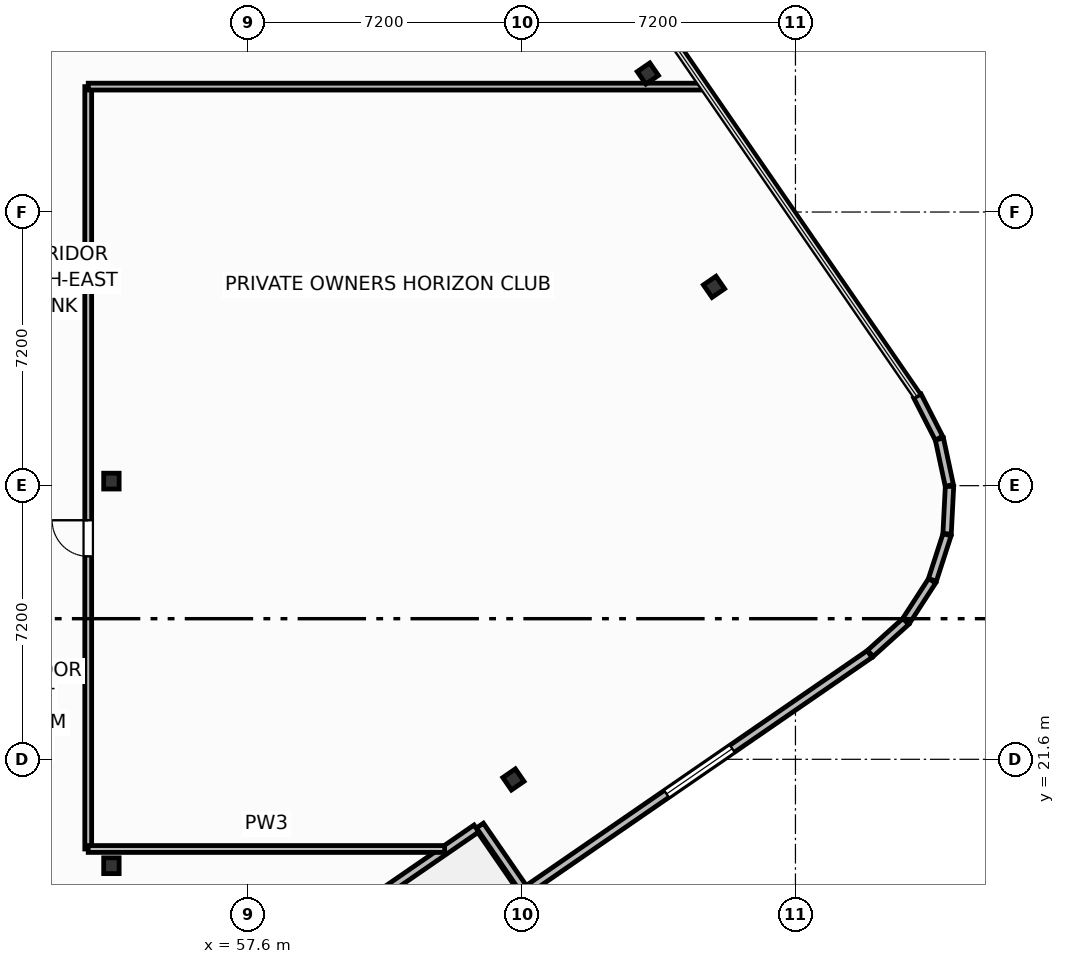
"""IFC4 building model, lengths in metres.
Left out: names, types, materials, properties, quantities, classifications, styles, units other than length and angle.
Written with IfcOpenShell. Run it as: python <this file> out.ifc"""

import sys

from ifc_helpers import new_model, si_unit, direction, frame, frame_2d, origin, origin_2d, place, context, subcontext, project, spatial, rectangle, i_section, extrude, element, fill, save


model = new_model("IFC4")
c1 = context("Model", 3, precision=1e-05, world=origin(), true_north=direction((0.0, 1.0)))
c2 = subcontext(c1, "Body", "Model", "MODEL_VIEW")
j1 = project(units=[si_unit("LENGTHUNIT", "METRE"), si_unit("PLANEANGLEUNIT", "RADIAN")], contexts=[c1])
p1 = place(None, origin())
s1 = spatial("IfcSite", under=j1, at=p1, CompositionType="ELEMENT")
p2 = place(p1, origin())
s2 = spatial("IfcBuilding", under=s1, at=p2, CompositionType="ELEMENT")
p3 = place(p2, frame((0.0, 0.0, 280.4)))
s3 = spatial("IfcBuildingStorey", under=s2, at=p3, CompositionType="ELEMENT", Elevation=280.4)
for number, where, z_axis, x_axis in (
    (1, (54.0, 18.8, 0.0), (0.0, 0.0, 1.0), (1.0, 0.0, 0.0)),
    (2, (54.0, 28.92, 0.0), (0.0, 0.0, 1.0), (1.0, 0.0, 0.0)),
):
    element("IfcColumn", number, at=place(p3, frame(where, z_axis=z_axis, x_axis=x_axis)), inside=s3, PredefinedType="COLUMN", context=c2, shape_type="SweptSolid", body=[
        extrude(i_section(OverallWidth=0.406, OverallDepth=0.416, WebThickness=0.03, FlangeThickness=0.048, FilletRadius=0.025, at=origin_2d()), origin(), (0.0, 0.0, 1.0), 3.7),
    ])
for number, where, z_axis, x_axis in (
    (3, (64.578, 21.07, 0.0), (0.0, 0.0, 1.0), (0.824, 0.567, 0.0)),
    (4, (69.857, 34.031, 0.0), (0.0, 0.0, 1.0), (0.824, 0.567, 0.0)),
    (5, (68.115, 39.644, 0.0), (0.0, 0.0, 1.0), (0.824, 0.567, 0.0)),
):
    element("IfcColumn", number, at=place(p3, frame(where, z_axis=z_axis, x_axis=x_axis)), inside=s3, PredefinedType="COLUMN", context=c2, shape_type="SweptSolid", body=[
        extrude(i_section(OverallWidth=0.401, OverallDepth=0.399, WebThickness=0.025, FlangeThickness=0.04, FilletRadius=0.022, at=origin_2d()), origin(), (0.0, 0.0, 1.0), 3.7),
    ])
p4 = place(p3, frame((63.605, 19.78, 0.0), z_axis=(0.0, 0.0, 1.0), x_axis=(-0.823541290762, -0.567256328665, 0.0)))
e6 = element("IfcWall", 6, at=p4, inside=s3, PredefinedType="SOLIDWALL", context=c2, shape_type="SweptSolid", body=[
    extrude(rectangle(XDim=5.567, YDim=0.22, at=frame_2d((2.784, 0.0))), origin(), (0.0, 0.0, 1.0), 2.73),
])
p5 = place(p4, frame((3.067, 0.0, 0.0)))
e7 = element("IfcOpeningElement", 7, at=p5, cuts=e6, PredefinedType="OPENING", context=c2, shape_type="SweptSolid", body=[
    extrude(rectangle(XDim=2.1, YDim=2.3, at=frame_2d((1.05, 1.15))), frame((0.0, 0.12, 0.0), z_axis=(0.0, -1.0, 0.0), x_axis=(1.0, 0.0, 0.0)), (0.0, 0.0, 1.0), 0.24),
])
p6 = place(p3, frame((63.698, 19.856, 0.0), z_axis=(0.0, 0.0, 1.0), x_axis=(0.567219383419, -0.823566737474, 0.0)))
e8 = element("IfcWall", 8, at=p6, inside=s3, PredefinedType="SOLIDWALL", context=c2, shape_type="SweptSolid", body=[
    extrude(rectangle(XDim=2.1, YDim=0.22, at=frame_2d((1.05, 0.0))), origin(), (0.0, 0.0, 1.0), 2.73),
])
p7 = place(p3, frame((64.992, 18.198, 0.0), z_axis=(0.0, 0.0, 1.0), x_axis=(0.823538117322, 0.56726093583, 0.0)))
e9 = element("IfcWall", 9, at=p7, inside=s3, PredefinedType="SOLIDWALL", context=c2, shape_type="SweptSolid", body=[
    extrude(rectangle(XDim=10.88, YDim=0.22, at=frame_2d((5.44, 0.0))), origin(), (0.0, 0.0, 1.0), 2.73),
])
p8 = place(p7, frame((4.39, 0.0, 0.8)))
e10 = element("IfcOpeningElement", 10, at=p8, cuts=e9, PredefinedType="OPENING", context=c2, shape_type="SweptSolid", body=[
    extrude(rectangle(XDim=2.1, YDim=1.75, at=frame_2d((1.05, 0.875))), frame((0.0, 0.12, 0.0), z_axis=(0.0, -1.0, 0.0), x_axis=(1.0, 0.0, 0.0)), (0.0, 0.0, 1.0), 0.24),
])
p9 = place(p3, frame((73.971, 24.387, 0.0), z_axis=(0.0, 0.0, 1.0), x_axis=(0.742501517089, 0.669844382764, 0.0)))
e11 = element("IfcWall", 11, at=p9, inside=s3, PredefinedType="SOLIDWALL", context=c2, shape_type="SweptSolid", body=[
    extrude(rectangle(XDim=1.257, YDim=0.22, at=frame_2d((0.628, 0.0))), origin(), (0.0, 0.0, 1.0), 2.73),
])
p10 = place(p3, frame((74.917, 25.25, 0.0), z_axis=(0.0, 0.0, 1.0), x_axis=(0.543778157277, 0.839229000731, 0.0)))
e12 = element("IfcWall", 12, at=p10, inside=s3, PredefinedType="SOLIDWALL", context=c2, shape_type="SweptSolid", body=[
    extrude(rectangle(XDim=1.249, YDim=0.22, at=frame_2d((0.624, 0.0))), origin(), (0.0, 0.0, 1.0), 2.73),
])
for number, where, z_axis, x_axis in (
    (13, (75.604, 26.321, 0.0), (0.0, 0.0, 1.0), (0.308, 0.951, 0.0)),
    (14, (75.99, 27.534, 0.0), (0.0, 0.0, 1.0), (0.051, 0.999, 0.0)),
    (15, (76.049, 28.805, 0.0), (0.0, 0.0, 1.0), (-0.209, 0.978, 0.0)),
    (16, (75.777, 30.049, 0.0), (0.0, 0.0, 1.0), (-0.455, 0.891, 0.0)),
):
    element("IfcWall", number, at=place(p3, frame(where, z_axis=z_axis, x_axis=x_axis)), inside=s3, PredefinedType="SOLIDWALL", context=c2, shape_type="SweptSolid", body=[
        extrude(rectangle(XDim=1.249, YDim=0.22, at=frame_2d((0.625, 0.0))), origin(), (0.0, 0.0, 1.0), 2.73),
    ])
p11 = place(p3, frame((53.39, 19.24, 0.0), z_axis=(0.0, 0.0, 1.0), x_axis=(0.0, 1.0, 0.0)))
e17 = element("IfcWall", 17, at=p11, inside=s3, PredefinedType="PARTITIONING", context=c2, shape_type="SweptSolid", body=[
    extrude(rectangle(XDim=20.06, YDim=0.18, at=frame_2d((10.03, 0.0))), origin(), (0.0, 0.0, 1.0), 3.45),
])
p12 = place(p11, frame((7.7, 0.0, 0.0)))
e18 = element("IfcOpeningElement", 18, at=p12, cuts=e17, PredefinedType="OPENING", context=c2, shape_type="SweptSolid", body=[
    extrude(rectangle(XDim=0.95, YDim=2.05, at=frame_2d((0.475, 1.025))), frame((0.0, 0.1, 0.0), z_axis=(0.0, -1.0, 0.0), x_axis=(1.0, 0.0, 0.0)), (0.0, 0.0, 1.0), 0.2),
])
p13 = place(p3, frame((53.39, 19.24, 0.0), z_axis=(0.0, 0.0, 1.0), x_axis=(1.0, 0.0, 0.0)))
e19 = element("IfcWall", 19, at=p13, inside=s3, PredefinedType="PARTITIONING", context=c2, shape_type="SweptSolid", body=[
    extrude(rectangle(XDim=9.378, YDim=0.18, at=frame_2d((4.689, 0.0))), origin(), (0.0, 0.0, 1.0), 2.739),
])
p14 = place(p3, frame((53.39, 39.3, 0.0), z_axis=(0.0, 0.0, 1.0), x_axis=(1.0, 0.0, 0.0)))
e20 = element("IfcWall", 20, at=p14, inside=s3, PredefinedType="PARTITIONING", context=c2, shape_type="SweptSolid", body=[
    extrude(rectangle(XDim=16.149, YDim=0.18, at=frame_2d((8.075, 0.0))), origin(), (0.0, 0.0, 1.0), 2.739),
])
p15 = place(p8, origin())
e21 = element("IfcWindow", 21, at=p15, inside=s3, PartitioningType="SINGLE_PANEL", PredefinedType="WINDOW", context=c2, shape_type="SweptSolid", body=[
    extrude(rectangle(XDim=2.1, YDim=1.75, at=frame_2d((1.05, 0.875))), frame((0.0, 0.03, 0.0), z_axis=(0.0, -1.0, 0.0), x_axis=(1.0, 0.0, 0.0)), (0.0, 0.0, 1.0), 0.06),
])
fill(e10, e21)
p16 = place(p12, origin())
e22 = element("IfcDoor", 22, at=p16, inside=s3, OperationType="SINGLE_SWING_RIGHT", PredefinedType="DOOR", context=c2, shape_type="SweptSolid", body=[
    extrude(rectangle(XDim=0.95, YDim=2.05, at=frame_2d((0.475, 1.025))), frame((0.0, 0.025, 0.0), z_axis=(0.0, -1.0, 0.0), x_axis=(1.0, 0.0, 0.0)), (0.0, 0.0, 1.0), 0.05),
])
fill(e18, e22)
save(model, sys.argv[1])
